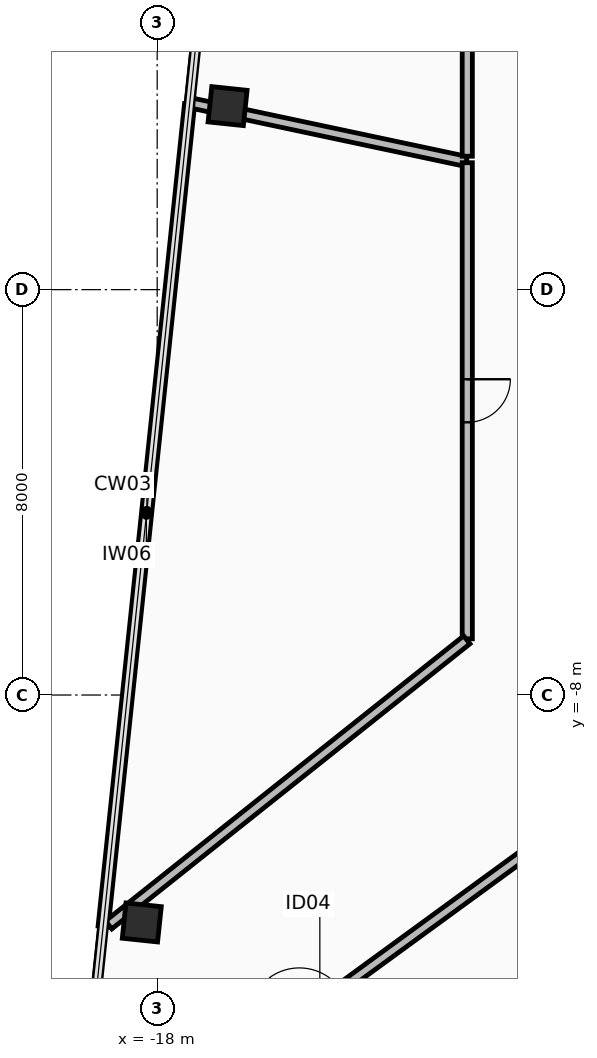
"""IFC4 building model, lengths in metres.
Left out: names, types, materials, properties, quantities, classifications, styles, units other than length and angle.
Written with IfcOpenShell. Run it as: python <this file> out.ifc"""

import sys

from ifc_helpers import new_model, si_unit, direction, frame, frame_2d, origin, origin_2d, place, context, subcontext, project, spatial, rectangle, hollow_rectangle, extrude, element, fill, save


model = new_model("IFC4")
c1 = context("Model", 3, precision=1e-05, world=origin(), true_north=direction((0.0, 1.0)))
c2 = subcontext(c1, "Body", "Model", "MODEL_VIEW")
j1 = project(units=[si_unit("LENGTHUNIT", "METRE"), si_unit("PLANEANGLEUNIT", "RADIAN")], contexts=[c1])
p1 = place(None, origin())
s1 = spatial("IfcSite", under=j1, at=p1, CompositionType="ELEMENT")
p2 = place(p1, origin())
s2 = spatial("IfcBuilding", under=s1, at=p2, CompositionType="ELEMENT")
p3 = place(p2, frame((0.0, 0.0, 126.85)))
s3 = spatial("IfcBuildingStorey", under=s2, at=p3, CompositionType="ELEMENT", Elevation=126.85)
for number, where, z_axis, x_axis in (
    (1, (-16.611, 3.622, 0.0), (0.0, 0.0, 1.0), (0.105, 0.995, 0.0)),
    (2, (-18.304, -12.488, 0.0), (0.0, 0.0, 1.0), (0.105, 0.995, 0.0)),
):
    element("IfcColumn", number, at=place(p3, frame(where, z_axis=z_axis, x_axis=x_axis)), inside=s3, PredefinedType="COLUMN", context=c2, shape_type="SweptSolid", body=[
        extrude(hollow_rectangle(XDim=0.7, YDim=0.7, WallThickness=0.04, at=origin_2d()), origin(), (0.0, 0.0, 1.0), 3.6),
    ])
p4 = place(p3, frame((-19.067, -12.57, 0.0), z_axis=(0.0, 0.0, 1.0), x_axis=(0.104530607356, 0.994521670013, 0.0)))
e3 = element("IfcWall", 3, at=p4, inside=s3, PredefinedType="PARTITIONING", context=c2, shape_type="SweptSolid", body=[
    extrude(rectangle(XDim=16.321, YDim=0.2, at=frame_2d((8.161, 0.0))), origin(), (0.0, 0.0, 1.0), 3.41),
])
p5 = place(p3, frame((-17.331, 3.684, 0.0), z_axis=(0.0, 0.0, 1.0), x_axis=(0.978148567961, -0.207907140322, 0.0)))
e4 = element("IfcWall", 4, at=p5, inside=s3, PredefinedType="PARTITIONING", context=c2, shape_type="SweptSolid", body=[
    extrude(rectangle(XDim=5.552, YDim=0.2, at=frame_2d((2.776, 0.0))), origin(), (0.0, 0.0, 1.0), 2.705),
])
p6 = place(p3, frame((-11.88, 2.505, 0.0), z_axis=(0.0, 0.0, 1.0), x_axis=(0.0, -1.0, 0.0)))
e5 = element("IfcWall", 5, at=p6, inside=s3, PredefinedType="PARTITIONING", context=c2, shape_type="SweptSolid", body=[
    extrude(rectangle(XDim=9.396, YDim=0.2, at=frame_2d((4.698, 0.0))), origin(), (0.0, 0.0, 1.0), 3.41),
])
p7 = place(p6, frame((4.273, 0.0, 0.0)))
e6 = element("IfcOpeningElement", 6, at=p7, cuts=e5, PredefinedType="OPENING", context=c2, shape_type="SweptSolid", body=[
    extrude(rectangle(XDim=0.85, YDim=2.1, at=frame_2d((0.425, 1.05))), frame((0.0, 0.11, 0.0), z_axis=(0.0, -1.0, 0.0), x_axis=(1.0, 0.0, 0.0)), (0.0, 0.0, 1.0), 0.22),
])
p8 = place(p3, frame((-11.889, -6.911, 0.0), z_axis=(0.0, 0.0, 1.0), x_axis=(-0.782379877643, -0.622801514979, 0.0)))
e7 = element("IfcWall", 7, at=p8, inside=s3, PredefinedType="PARTITIONING", context=c2, shape_type="SweptSolid", body=[
    extrude(rectangle(XDim=9.034, YDim=0.2, at=frame_2d((4.517, 0.0))), origin(), (0.0, 0.0, 1.0), 2.705),
])
p9 = place(p3, frame((-11.88, 10.579, 0.0), z_axis=(0.0, 0.0, 1.0), x_axis=(0.0, -1.0, 0.0)))
e8 = element("IfcWall", 8, at=p9, inside=s3, PredefinedType="PARTITIONING", context=c2, shape_type="SweptSolid", body=[
    extrude(rectangle(XDim=7.947, YDim=0.2, at=frame_2d((3.973, 0.0))), origin(), (0.0, 0.0, 1.0), 2.855),
])
p10 = place(p9, frame((3.373, 0.0, 0.0)))
e9 = element("IfcOpeningElement", 9, at=p10, cuts=e8, PredefinedType="OPENING", context=c2, shape_type="SweptSolid", body=[
    extrude(rectangle(XDim=1.2, YDim=2.15, at=frame_2d((0.6, 1.075))), frame((0.0, 0.11, 0.0), z_axis=(0.0, -1.0, 0.0), x_axis=(1.0, 0.0, 0.0)), (0.0, 0.0, 1.0), 0.22),
])
p11 = place(p3, frame((-19.595, -17.596, 0.0), z_axis=(0.0, 0.0, 1.0), x_axis=(0.807843239946, 0.589397403857, 0.0)))
e10 = element("IfcWall", 10, at=p11, inside=s3, PredefinedType="PARTITIONING", context=c2, shape_type="SweptSolid", body=[
    extrude(rectangle(XDim=11.896, YDim=0.2, at=frame_2d((5.948, 0.0))), origin(), (0.0, 0.0, 1.0), 2.705),
])
p12 = place(p11, frame((5.448, 0.0, 0.0)))
e11 = element("IfcOpeningElement", 11, at=p12, cuts=e10, PredefinedType="OPENING", context=c2, shape_type="SweptSolid", body=[
    extrude(rectangle(XDim=1.0, YDim=2.15, at=frame_2d((0.5, 1.075))), frame((0.0, 0.11, 0.0), z_axis=(0.0, -1.0, 0.0), x_axis=(1.0, 0.0, 0.0)), (0.0, 0.0, 1.0), 0.22),
])
p13 = place(p7, origin())
e12 = element("IfcDoor", 12, at=p13, inside=s3, OperationType="SINGLE_SWING_RIGHT", PredefinedType="DOOR", context=c2, shape_type="SweptSolid", body=[
    extrude(rectangle(XDim=0.85, YDim=2.1, at=frame_2d((0.425, 1.05))), frame((0.0, 0.025, 0.0), z_axis=(0.0, -1.0, 0.0), x_axis=(1.0, 0.0, 0.0)), (0.0, 0.0, 1.0), 0.05),
])
fill(e6, e12)
save(model, sys.argv[1])
